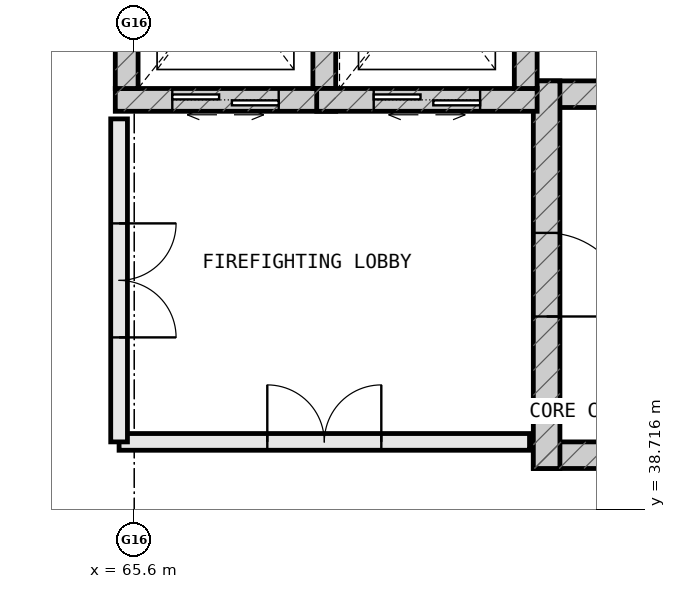
"""IFC4 building model, lengths in metres.
Left out: names, types, materials, properties, quantities, classifications, styles, units other than length and angle.
Written with IfcOpenShell. Run it as: python <this file> out.ifc"""

import sys

from ifc_helpers import new_model, si_unit, direction, frame, frame_2d, origin, place, context, subcontext, project, spatial, rectangle, extrude, element, fill, save


model = new_model("IFC4")
c1 = context("Model", 3, precision=1e-05, world=origin(), true_north=direction((0.0, 1.0)))
c2 = subcontext(c1, "Body", "Model", "MODEL_VIEW")
j1 = project(units=[si_unit("LENGTHUNIT", "METRE"), si_unit("PLANEANGLEUNIT", "RADIAN")], contexts=[c1])
p1 = place(None, origin())
s1 = spatial("IfcSite", under=j1, at=p1, CompositionType="ELEMENT")
p2 = place(p1, origin())
s2 = spatial("IfcBuilding", under=s1, at=p2, CompositionType="ELEMENT")
p3 = place(p2, frame((0.0, 0.0, 10.8)))
s3 = spatial("IfcBuildingStorey", under=s2, at=p3, CompositionType="ELEMENT", Elevation=10.8)
for number, where, z_axis, x_axis in (
    (1, (70.85, 39.425, 0.0), (0.0, 0.0, 1.0), (1.0, 0.0, 0.0)),
    (2, (82.95, 44.175, 0.0), (0.0, 0.0, 1.0), (-1.0, 0.0, 0.0)),
):
    element("IfcWall", number, at=place(p3, frame(where, z_axis=z_axis, x_axis=x_axis)), inside=s3, PredefinedType="SHEAR", context=c2, shape_type="SweptSolid", body=[
        extrude(rectangle(XDim=12.1, YDim=0.35, at=frame_2d((6.05, 0.0))), origin(), (0.0, 0.0, 1.0), 5.4),
    ])
p4 = place(p3, frame((71.025, 44.35, 0.0), z_axis=(0.0, 0.0, 1.0), x_axis=(0.0, -1.0, 0.0)))
e3 = element("IfcWall", 3, at=p4, inside=s3, PredefinedType="SHEAR", context=c2, shape_type="SweptSolid", body=[
    extrude(rectangle(XDim=5.1, YDim=0.35, at=frame_2d((2.55, 0.0))), origin(), (0.0, 0.0, 1.0), 5.4),
])
p5 = place(p4, frame((2.0, 0.0, 0.0)))
e4 = element("IfcOpeningElement", 4, at=p5, cuts=e3, PredefinedType="OPENING", context=c2, shape_type="SweptSolid", body=[
    extrude(rectangle(XDim=1.1, YDim=2.2, at=frame_2d((0.55, 1.1))), frame((0.0, 0.187, 0.0), z_axis=(0.0, -1.0, 0.0), x_axis=(1.0, 0.0, 0.0)), (0.0, 0.0, 1.0), 0.374),
])
p6 = place(p3, frame((65.35, 44.1, 0.0), z_axis=(0.0, 0.0, 1.0), x_axis=(1.0, 0.0, 0.0)))
e5 = element("IfcWall", 5, at=p6, inside=s3, PredefinedType="SHEAR", context=c2, shape_type="SweptSolid", body=[
    extrude(rectangle(XDim=2.9, YDim=0.3, at=frame_2d((1.45, 0.0))), origin(), (0.0, 0.0, 1.0), 5.4),
])
p7 = place(p6, frame((0.75, 0.0, 0.0)))
e6 = element("IfcOpeningElement", 6, at=p7, cuts=e5, PredefinedType="OPENING", context=c2, shape_type="SweptSolid", body=[
    extrude(rectangle(XDim=1.4, YDim=2.2, at=frame_2d((0.7, 1.1))), frame((0.0, 0.162, 0.0), z_axis=(0.0, -1.0, 0.0), x_axis=(1.0, 0.0, 0.0)), (0.0, 0.0, 1.0), 0.324),
])
for number, where, z_axis, x_axis in (
    (7, (68.1, 44.25, 0.0), (0.0, 0.0, 1.0), (0.0, 1.0, 0.0)),
    (8, (65.5, 47.15, 0.0), (0.0, 0.0, 1.0), (0.0, -1.0, 0.0)),
):
    element("IfcWall", number, at=place(p3, frame(where, z_axis=z_axis, x_axis=x_axis)), inside=s3, PredefinedType="SHEAR", context=c2, shape_type="SweptSolid", body=[
        extrude(rectangle(XDim=2.9, YDim=0.3, at=frame_2d((1.45, 0.0))), origin(), (0.0, 0.0, 1.0), 5.4),
    ])
p8 = place(p3, frame((68.0, 44.1, 0.0), z_axis=(0.0, 0.0, 1.0), x_axis=(1.0, 0.0, 0.0)))
e9 = element("IfcWall", 9, at=p8, inside=s3, PredefinedType="SHEAR", context=c2, shape_type="SweptSolid", body=[
    extrude(rectangle(XDim=2.9, YDim=0.3, at=frame_2d((1.45, 0.0))), origin(), (0.0, 0.0, 1.0), 5.4),
])
p9 = place(p8, frame((0.75, 0.0, 0.0)))
e10 = element("IfcOpeningElement", 10, at=p9, cuts=e9, PredefinedType="OPENING", context=c2, shape_type="SweptSolid", body=[
    extrude(rectangle(XDim=1.4, YDim=2.2, at=frame_2d((0.7, 1.1))), frame((0.0, 0.162, 0.0), z_axis=(0.0, -1.0, 0.0), x_axis=(1.0, 0.0, 0.0)), (0.0, 0.0, 1.0), 0.324),
])
p10 = place(p3, frame((70.75, 44.25, 0.0), z_axis=(0.0, 0.0, 1.0), x_axis=(0.0, 1.0, 0.0)))
e11 = element("IfcWall", 11, at=p10, inside=s3, PredefinedType="SHEAR", context=c2, shape_type="SweptSolid", body=[
    extrude(rectangle(XDim=2.9, YDim=0.3, at=frame_2d((1.45, 0.0))), origin(), (0.0, 0.0, 1.0), 5.4),
])
p11 = place(p3, frame((65.4, 39.6, 0.0), z_axis=(0.0, 0.0, 1.0), x_axis=(1.0, 0.0, 0.0)))
e12 = element("IfcWall", 12, at=p11, inside=s3, PredefinedType="STANDARD", context=c2, shape_type="SweptSolid", body=[
    extrude(rectangle(XDim=5.4, YDim=0.22, at=frame_2d((2.7, 0.0))), origin(), (0.0, 0.0, 1.0), 4.8),
])
p12 = place(p11, frame((1.95, 0.0, 0.0)))
e13 = element("IfcOpeningElement", 13, at=p12, cuts=e12, PredefinedType="OPENING", context=c2, shape_type="SweptSolid", body=[
    extrude(rectangle(XDim=1.5, YDim=2.2, at=frame_2d((0.75, 1.1))), frame((0.0, 0.122, 0.0), z_axis=(0.0, -1.0, 0.0), x_axis=(1.0, 0.0, 0.0)), (0.0, 0.0, 1.0), 0.244),
])
p13 = place(p3, frame((65.4, 43.85, 0.0), z_axis=(0.0, 0.0, 1.0), x_axis=(0.0, -1.0, 0.0)))
e14 = element("IfcWall", 14, at=p13, inside=s3, PredefinedType="STANDARD", context=c2, shape_type="SweptSolid", body=[
    extrude(rectangle(XDim=4.25, YDim=0.22, at=frame_2d((2.125, 0.0))), origin(), (0.0, 0.0, 1.0), 4.8),
])
p14 = place(p13, frame((1.375, 0.0, 0.0)))
e15 = element("IfcOpeningElement", 15, at=p14, cuts=e14, PredefinedType="OPENING", context=c2, shape_type="SweptSolid", body=[
    extrude(rectangle(XDim=1.5, YDim=2.2, at=frame_2d((0.75, 1.1))), frame((0.0, 0.122, 0.0), z_axis=(0.0, -1.0, 0.0), x_axis=(1.0, 0.0, 0.0)), (0.0, 0.0, 1.0), 0.244),
])
p15 = place(p5, origin())
e16 = element("IfcDoor", 16, at=p15, inside=s3, OperationType="SINGLE_SWING_RIGHT", PredefinedType="DOOR", context=c2, shape_type="SweptSolid", body=[
    extrude(rectangle(XDim=1.1, YDim=2.2, at=frame_2d((0.55, 1.1))), frame((0.0, 0.025, 0.0), z_axis=(0.0, -1.0, 0.0), x_axis=(1.0, 0.0, 0.0)), (0.0, 0.0, 1.0), 0.05),
])
fill(e4, e16)
p16 = place(p7, origin())
e17 = element("IfcDoor", 17, at=p16, inside=s3, OperationType="DOUBLE_DOOR_SLIDING", PredefinedType="DOOR", context=c2, shape_type="SweptSolid", body=[
    extrude(rectangle(XDim=1.4, YDim=2.2, at=frame_2d((0.7, 1.1))), frame((0.0, 0.025, 0.0), z_axis=(0.0, -1.0, 0.0), x_axis=(1.0, 0.0, 0.0)), (0.0, 0.0, 1.0), 0.05),
])
fill(e6, e17)
p17 = place(p9, origin())
e18 = element("IfcDoor", 18, at=p17, inside=s3, OperationType="DOUBLE_DOOR_SLIDING", PredefinedType="DOOR", context=c2, shape_type="SweptSolid", body=[
    extrude(rectangle(XDim=1.4, YDim=2.2, at=frame_2d((0.7, 1.1))), frame((0.0, 0.025, 0.0), z_axis=(0.0, -1.0, 0.0), x_axis=(1.0, 0.0, 0.0)), (0.0, 0.0, 1.0), 0.05),
])
fill(e10, e18)
p18 = place(p12, origin())
e19 = element("IfcDoor", 19, at=p18, inside=s3, OperationType="DOUBLE_DOOR_SINGLE_SWING", PredefinedType="DOOR", context=c2, shape_type="SweptSolid", body=[
    extrude(rectangle(XDim=1.5, YDim=2.2, at=frame_2d((0.75, 1.1))), frame((0.0, 0.025, 0.0), z_axis=(0.0, -1.0, 0.0), x_axis=(1.0, 0.0, 0.0)), (0.0, 0.0, 1.0), 0.05),
])
fill(e13, e19)
p19 = place(p14, origin())
e20 = element("IfcDoor", 20, at=p19, inside=s3, OperationType="DOUBLE_DOOR_SINGLE_SWING", PredefinedType="DOOR", context=c2, shape_type="SweptSolid", body=[
    extrude(rectangle(XDim=1.5, YDim=2.2, at=frame_2d((0.75, 1.1))), frame((0.0, 0.025, 0.0), z_axis=(0.0, -1.0, 0.0), x_axis=(1.0, 0.0, 0.0)), (0.0, 0.0, 1.0), 0.05),
])
fill(e15, e20)
save(model, sys.argv[1])
